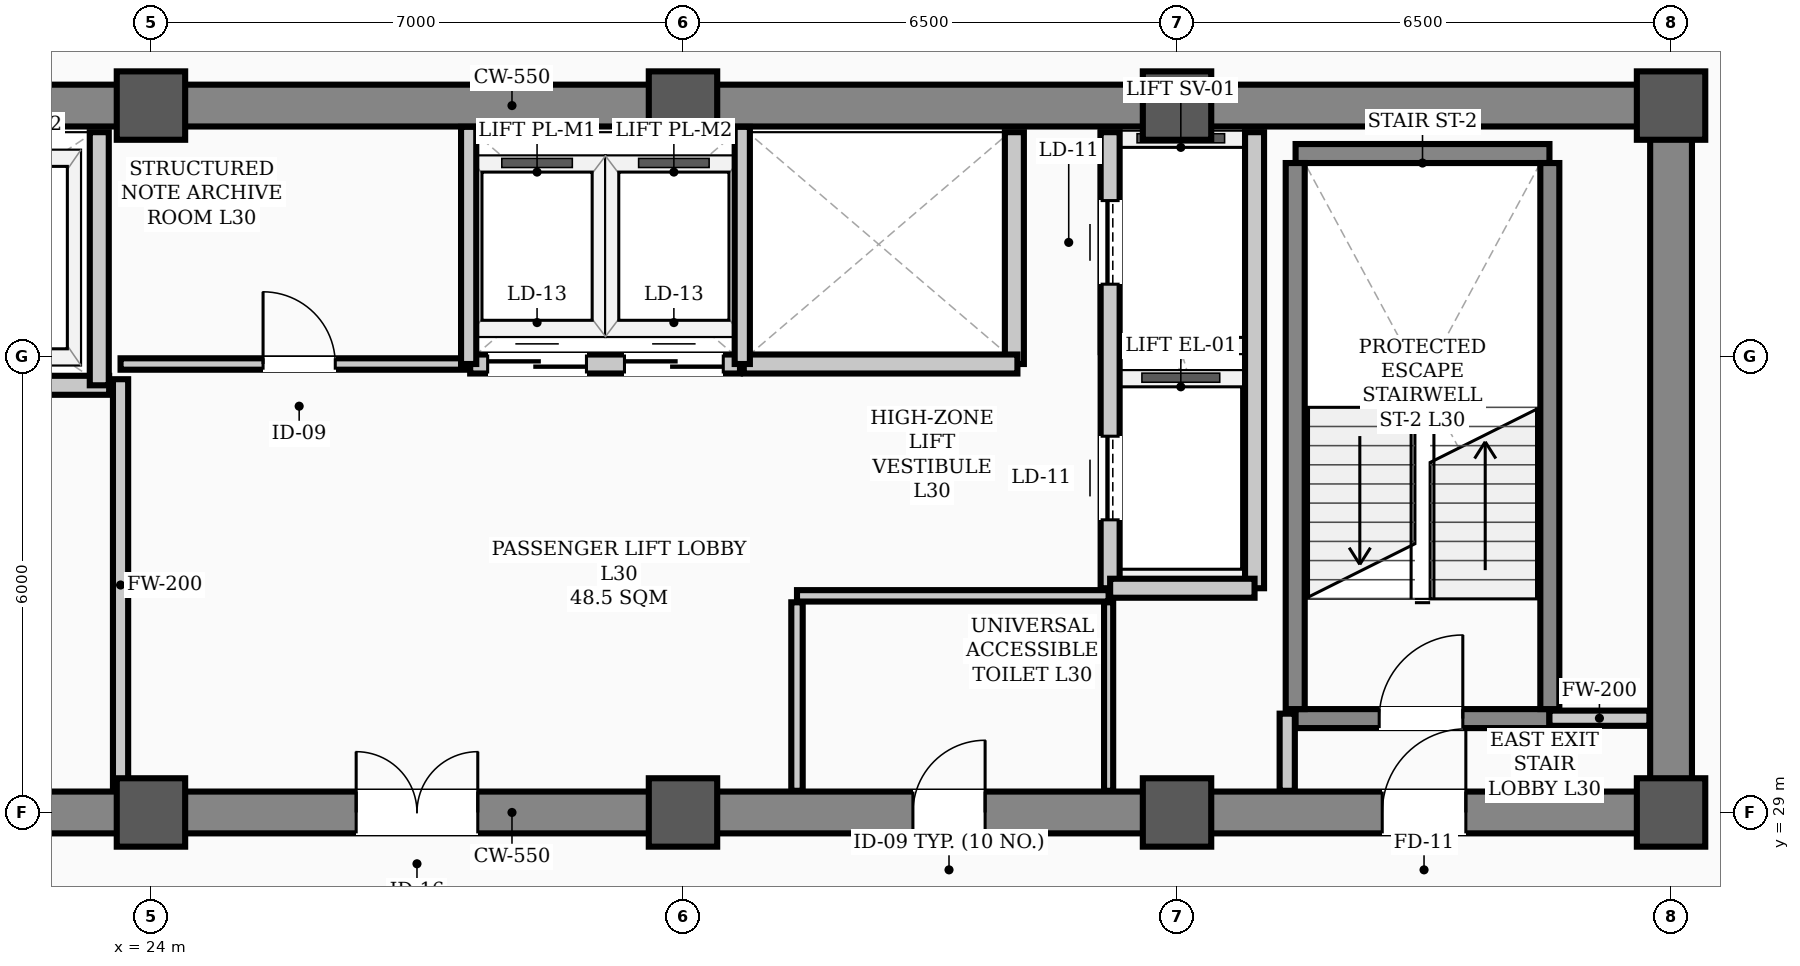
"""IFC4 building model, lengths in metres.
Left out: names, types, materials, properties, quantities, classifications, styles, units other than length and angle.
Written with IfcOpenShell. Run it as: python <this file> out.ifc"""

import sys

from ifc_helpers import new_model, si_unit, direction, frame, frame_2d, origin, origin_2d, place, context, subcontext, project, spatial, rectangle, hollow_rectangle, extrude, element, fill, save


model = new_model("IFC4")
c1 = context("Model", 3, precision=1e-05, world=origin(), true_north=direction((0.0, 1.0)))
c2 = subcontext(c1, "Body", "Model", "MODEL_VIEW")
j1 = project(units=[si_unit("LENGTHUNIT", "METRE"), si_unit("PLANEANGLEUNIT", "RADIAN")], contexts=[c1])
p1 = place(None, origin())
s1 = spatial("IfcSite", under=j1, at=p1, CompositionType="ELEMENT")
p2 = place(p1, origin())
s2 = spatial("IfcBuilding", under=s1, at=p2, CompositionType="ELEMENT")
p3 = place(p2, frame((0.0, 0.0, 122.7)))
s3 = spatial("IfcBuildingStorey", under=s2, at=p3, CompositionType="ELEMENT", Elevation=122.7)
for number, where, z_axis, x_axis in (
    (1, (24.0, 29.0, 0.0), (0.0, 0.0, 1.0), (1.0, 0.0, 0.0)),
    (2, (24.0, 38.3, 0.0), (0.0, 0.0, 1.0), (1.0, 0.0, 0.0)),
    (3, (31.0, 29.0, 0.0), (0.0, 0.0, 1.0), (1.0, 0.0, 0.0)),
    (4, (31.0, 38.3, 0.0), (0.0, 0.0, 1.0), (1.0, 0.0, 0.0)),
    (5, (37.5, 29.0, 0.0), (0.0, 0.0, 1.0), (1.0, 0.0, 0.0)),
    (6, (37.5, 38.3, 0.0), (0.0, 0.0, 1.0), (1.0, 0.0, 0.0)),
    (7, (44.0, 29.0, 0.0), (0.0, 0.0, 1.0), (1.0, 0.0, 0.0)),
    (8, (44.0, 38.3, 0.0), (0.0, 0.0, 1.0), (1.0, 0.0, 0.0)),
):
    element("IfcColumn", number, at=place(p3, frame(where, z_axis=z_axis, x_axis=x_axis)), inside=s3, PredefinedType="COLUMN", context=c2, shape_type="SweptSolid", body=[
        extrude(hollow_rectangle(XDim=0.9, YDim=0.9, WallThickness=0.035, InnerFilletRadius=0.017, OuterFilletRadius=0.052, at=origin_2d()), origin(), (0.0, 0.0, 1.0), 3.9),
    ])
p4 = place(p3, frame((13.5, 29.0, 0.0), z_axis=(0.0, 0.0, 1.0), x_axis=(1.0, 0.0, 0.0)))
e9 = element("IfcWall", 9, at=p4, inside=s3, PredefinedType="SHEAR", context=c2, shape_type="SweptSolid", body=[
    extrude(rectangle(XDim=30.5, YDim=0.55, at=frame_2d((15.25, 0.0))), origin(), (0.0, 0.0, 1.0), 3.72),
])
p5 = place(p4, frame((1.75, 0.0, 0.0)))
e10 = element("IfcOpeningElement", 10, at=p5, cuts=e9, PredefinedType="OPENING", context=c2, shape_type="SweptSolid", body=[
    extrude(rectangle(XDim=1.1, YDim=2.08, at=frame_2d((0.55, 1.04))), frame((0.0, 0.285, 0.0), z_axis=(0.0, -1.0, 0.0), x_axis=(1.0, 0.0, 0.0)), (0.0, 0.0, 1.0), 0.57),
])
p6 = place(p4, frame((26.7, 0.0, 0.0)))
e11 = element("IfcOpeningElement", 11, at=p6, cuts=e9, PredefinedType="OPENING", context=c2, shape_type="SweptSolid", body=[
    extrude(rectangle(XDim=1.1, YDim=2.08, at=frame_2d((0.55, 1.04))), frame((0.0, 0.285, 0.0), z_axis=(0.0, -1.0, 0.0), x_axis=(1.0, 0.0, 0.0)), (0.0, 0.0, 1.0), 0.57),
])
p7 = place(p4, frame((6.8, 0.0, 0.0)))
e12 = element("IfcOpeningElement", 12, at=p7, cuts=e9, PredefinedType="OPENING", context=c2, shape_type="SweptSolid", body=[
    extrude(rectangle(XDim=1.1, YDim=2.08, at=frame_2d((0.55, 1.04))), frame((0.0, 0.285, 0.0), z_axis=(0.0, -1.0, 0.0), x_axis=(1.0, 0.0, 0.0)), (0.0, 0.0, 1.0), 0.57),
])
p8 = place(p4, frame((13.2, 0.0, 0.0)))
e13 = element("IfcOpeningElement", 13, at=p8, cuts=e9, PredefinedType="OPENING", context=c2, shape_type="SweptSolid", body=[
    extrude(rectangle(XDim=1.6, YDim=2.08, at=frame_2d((0.8, 1.04))), frame((0.0, 0.285, 0.0), z_axis=(0.0, -1.0, 0.0), x_axis=(1.0, 0.0, 0.0)), (0.0, 0.0, 1.0), 0.57),
])
p9 = place(p4, frame((20.525, 0.0, 0.0)))
e14 = element("IfcOpeningElement", 14, at=p9, cuts=e9, PredefinedType="OPENING", context=c2, shape_type="SweptSolid", body=[
    extrude(rectangle(XDim=0.95, YDim=2.08, at=frame_2d((0.475, 1.04))), frame((0.0, 0.285, 0.0), z_axis=(0.0, -1.0, 0.0), x_axis=(1.0, 0.0, 0.0)), (0.0, 0.0, 1.0), 0.57),
])
p10 = place(p3, frame((13.5, 38.3, 0.0), z_axis=(0.0, 0.0, 1.0), x_axis=(1.0, 0.0, 0.0)))
e15 = element("IfcWall", 15, at=p10, inside=s3, PredefinedType="SHEAR", context=c2, shape_type="SweptSolid", body=[
    extrude(rectangle(XDim=30.5, YDim=0.55, at=frame_2d((15.25, 0.0))), origin(), (0.0, 0.0, 1.0), 3.72),
])
p11 = place(p3, frame((44.0, 29.35, 0.0), z_axis=(0.0, 0.0, 1.0), x_axis=(0.0, 1.0, 0.0)))
e16 = element("IfcWall", 16, at=p11, inside=s3, PredefinedType="SHEAR", context=c2, shape_type="SweptSolid", body=[
    extrude(rectangle(XDim=8.6, YDim=0.55, at=frame_2d((4.3, 0.0))), origin(), (0.0, 0.0, 1.0), 3.72),
])
p12 = place(p3, frame((39.06, 30.235, 0.0), z_axis=(0.0, 0.0, 1.0), x_axis=(1.0, 0.0, 0.0)))
e17 = element("IfcWall", 17, at=p12, inside=s3, PredefinedType="STANDARD", context=c2, shape_type="SweptSolid", body=[
    extrude(rectangle(XDim=3.34, YDim=0.25, at=frame_2d((1.67, 0.0))), origin(), (0.0, 0.0, 1.0), 3.72),
])
p13 = place(p12, frame((1.1, 0.0, 0.0)))
e18 = element("IfcOpeningElement", 18, at=p13, cuts=e17, PredefinedType="OPENING", context=c2, shape_type="SweptSolid", body=[
    extrude(rectangle(XDim=1.1, YDim=2.08, at=frame_2d((0.55, 1.04))), frame((0.0, 0.135, 0.0), z_axis=(0.0, -1.0, 0.0), x_axis=(1.0, 0.0, 0.0)), (0.0, 0.0, 1.0), 0.27),
])
p14 = place(p3, frame((39.06, 37.669, 0.0), z_axis=(0.0, 0.0, 1.0), x_axis=(1.0, 0.0, 0.0)))
e19 = element("IfcWall", 19, at=p14, inside=s3, PredefinedType="STANDARD", context=c2, shape_type="SweptSolid", body=[
    extrude(rectangle(XDim=3.34, YDim=0.25, at=frame_2d((1.67, 0.0))), origin(), (0.0, 0.0, 1.0), 3.72),
])
for number, where, z_axis, x_axis in (
    (20, (39.055, 30.36, 0.0), (0.0, 0.0, 1.0), (0.0, 1.0, 0.0)),
    (21, (42.405, 30.36, 0.0), (0.0, 0.0, 1.0), (0.0, 1.0, 0.0)),
):
    element("IfcWall", number, at=place(p3, frame(where, z_axis=z_axis, x_axis=x_axis)), inside=s3, PredefinedType="STANDARD", context=c2, shape_type="SweptSolid", body=[
        extrude(rectangle(XDim=7.184, YDim=0.25, at=frame_2d((3.592, 0.0))), origin(), (0.0, 0.0, 1.0), 3.72),
    ])
p15 = place(p3, frame((18.1, 34.62, 0.0), z_axis=(0.0, 0.0, 1.0), x_axis=(1.0, 0.0, 0.0)))
e22 = element("IfcWall", 22, at=p15, inside=s3, PredefinedType="STANDARD", context=c2, shape_type="SweptSolid", body=[
    extrude(rectangle(XDim=5.35, YDim=0.25, at=frame_2d((2.675, 0.0))), origin(), (0.0, 0.0, 1.0), 3.72),
])
p16 = place(p15, frame((0.85, 0.0, 0.0)))
e23 = element("IfcOpeningElement", 23, at=p16, cuts=e22, PredefinedType="OPENING", context=c2, shape_type="SweptSolid", body=[
    extrude(rectangle(XDim=1.1, YDim=2.08, at=frame_2d((0.55, 1.04))), frame((0.0, 0.135, 0.0), z_axis=(0.0, -1.0, 0.0), x_axis=(1.0, 0.0, 0.0)), (0.0, 0.0, 1.0), 0.27),
])
p17 = place(p15, frame((3.45, 0.0, 0.0)))
e24 = element("IfcOpeningElement", 24, at=p17, cuts=e22, PredefinedType="OPENING", context=c2, shape_type="SweptSolid", body=[
    extrude(rectangle(XDim=1.1, YDim=2.08, at=frame_2d((0.55, 1.04))), frame((0.0, 0.135, 0.0), z_axis=(0.0, -1.0, 0.0), x_axis=(1.0, 0.0, 0.0)), (0.0, 0.0, 1.0), 0.27),
])
p18 = place(p3, frame((36.62, 31.95, 0.0), z_axis=(0.0, 0.0, 1.0), x_axis=(0.0, 1.0, 0.0)))
e25 = element("IfcWall", 25, at=p18, inside=s3, PredefinedType="STANDARD", context=c2, shape_type="SweptSolid", body=[
    extrude(rectangle(XDim=6.0, YDim=0.25, at=frame_2d((3.0, 0.0))), origin(), (0.0, 0.0, 1.0), 3.72),
])
p19 = place(p18, frame((0.9, 0.0, 0.0)))
e26 = element("IfcOpeningElement", 26, at=p19, cuts=e25, PredefinedType="OPENING", context=c2, shape_type="SweptSolid", body=[
    extrude(rectangle(XDim=1.1, YDim=2.08, at=frame_2d((0.55, 1.04))), frame((0.0, 0.135, 0.0), z_axis=(0.0, -1.0, 0.0), x_axis=(1.0, 0.0, 0.0)), (0.0, 0.0, 1.0), 0.27),
])
p20 = place(p18, frame((4.0, 0.0, 0.0)))
e27 = element("IfcOpeningElement", 27, at=p20, cuts=e25, PredefinedType="OPENING", context=c2, shape_type="SweptSolid", body=[
    extrude(rectangle(XDim=1.1, YDim=2.08, at=frame_2d((0.55, 1.04))), frame((0.0, 0.135, 0.0), z_axis=(0.0, -1.0, 0.0), x_axis=(1.0, 0.0, 0.0)), (0.0, 0.0, 1.0), 0.27),
])
p21 = place(p3, frame((38.52, 31.95, 0.0), z_axis=(0.0, 0.0, 1.0), x_axis=(0.0, 1.0, 0.0)))
e28 = element("IfcWall", 28, at=p21, inside=s3, PredefinedType="STANDARD", context=c2, shape_type="SweptSolid", body=[
    extrude(rectangle(XDim=6.0, YDim=0.25, at=frame_2d((3.0, 0.0))), origin(), (0.0, 0.0, 1.0), 3.48),
])
p22 = place(p3, frame((36.62, 31.95, 0.0), z_axis=(0.0, 0.0, 1.0), x_axis=(1.0, 0.0, 0.0)))
e29 = element("IfcWall", 29, at=p22, inside=s3, PredefinedType="STANDARD", context=c2, shape_type="SweptSolid", body=[
    extrude(rectangle(XDim=1.9, YDim=0.25, at=frame_2d((0.95, 0.0))), origin(), (0.0, 0.0, 1.0), 3.48),
])
p23 = place(p3, frame((23.32, 34.62, 0.0), z_axis=(0.0, 0.0, 1.0), x_axis=(0.0, 1.0, 0.0)))
e30 = element("IfcWall", 30, at=p23, inside=s3, PredefinedType="STANDARD", context=c2, shape_type="SweptSolid", body=[
    extrude(rectangle(XDim=3.33, YDim=0.25, at=frame_2d((1.665, 0.0))), origin(), (0.0, 0.0, 1.0), 3.72),
])
p24 = place(p3, frame((35.36, 34.9, 0.0), z_axis=(0.0, 0.0, 1.0), x_axis=(0.0, 1.0, 0.0)))
e31 = element("IfcWall", 31, at=p24, inside=s3, PredefinedType="STANDARD", context=c2, shape_type="SweptSolid", body=[
    extrude(rectangle(XDim=3.05, YDim=0.25, at=frame_2d((1.525, 0.0))), origin(), (0.0, 0.0, 1.0), 3.72),
])
p25 = place(p3, frame((28.2, 34.9, 0.0), z_axis=(0.0, 0.0, 1.0), x_axis=(1.0, 0.0, 0.0)))
e32 = element("IfcWall", 32, at=p25, inside=s3, PredefinedType="STANDARD", context=c2, shape_type="SweptSolid", body=[
    extrude(rectangle(XDim=3.55, YDim=0.25, at=frame_2d((1.775, 0.0))), origin(), (0.0, 0.0, 1.0), 3.72),
])
p26 = place(p25, frame((0.23, 0.0, 0.0)))
e33 = element("IfcOpeningElement", 33, at=p26, cuts=e32, PredefinedType="OPENING", context=c2, shape_type="SweptSolid", body=[
    extrude(rectangle(XDim=1.3, YDim=2.08, at=frame_2d((0.65, 1.04))), frame((0.0, 0.135, 0.0), z_axis=(0.0, -1.0, 0.0), x_axis=(1.0, 0.0, 0.0)), (0.0, 0.0, 1.0), 0.27),
])
p27 = place(p25, frame((2.03, 0.0, 0.0)))
e34 = element("IfcOpeningElement", 34, at=p27, cuts=e32, PredefinedType="OPENING", context=c2, shape_type="SweptSolid", body=[
    extrude(rectangle(XDim=1.3, YDim=2.08, at=frame_2d((0.65, 1.04))), frame((0.0, 0.135, 0.0), z_axis=(0.0, -1.0, 0.0), x_axis=(1.0, 0.0, 0.0)), (0.0, 0.0, 1.0), 0.27),
])
p28 = place(p3, frame((31.8, 34.9, 0.0), z_axis=(0.0, 0.0, 1.0), x_axis=(1.0, 0.0, 0.0)))
e35 = element("IfcWall", 35, at=p28, inside=s3, PredefinedType="STANDARD", context=c2, shape_type="SweptSolid", body=[
    extrude(rectangle(XDim=3.6, YDim=0.25, at=frame_2d((1.8, 0.0))), origin(), (0.0, 0.0, 1.0), 3.72),
])
p29 = place(p3, frame((42.4, 30.24, 0.0), z_axis=(0.0, 0.0, 1.0), x_axis=(1.0, 0.0, 0.0)))
e36 = element("IfcWall", 36, at=p29, inside=s3, PredefinedType="STANDARD", context=c2, shape_type="SweptSolid", body=[
    extrude(rectangle(XDim=1.315, YDim=0.2, at=frame_2d((0.658, 0.0))), origin(), (0.0, 0.0, 1.0), 3.1),
])
p30 = place(p3, frame((23.6, 34.9, 0.0), z_axis=(0.0, 0.0, 1.0), x_axis=(1.0, 0.0, 0.0)))
e37 = element("IfcWall", 37, at=p30, inside=s3, PredefinedType="PARTITIONING", context=c2, shape_type="SweptSolid", body=[
    extrude(rectangle(XDim=4.58, YDim=0.15, at=frame_2d((2.29, 0.0))), origin(), (0.0, 0.0, 1.0), 3.72),
])
p31 = place(p30, frame((1.875, 0.0, 0.0)))
e38 = element("IfcOpeningElement", 38, at=p31, cuts=e37, PredefinedType="OPENING", context=c2, shape_type="SweptSolid", body=[
    extrude(rectangle(XDim=0.95, YDim=2.08, at=frame_2d((0.475, 1.04))), frame((0.0, 0.085, 0.0), z_axis=(0.0, -1.0, 0.0), x_axis=(1.0, 0.0, 0.0)), (0.0, 0.0, 1.0), 0.17),
])
p32 = place(p3, frame((32.5, 31.85, 0.0), z_axis=(0.0, 0.0, 1.0), x_axis=(1.0, 0.0, 0.0)))
e39 = element("IfcWall", 39, at=p32, inside=s3, PredefinedType="PARTITIONING", context=c2, shape_type="SweptSolid", body=[
    extrude(rectangle(XDim=4.1, YDim=0.15, at=frame_2d((2.05, 0.0))), origin(), (0.0, 0.0, 1.0), 3.72),
])
p33 = place(p3, frame((38.95, 29.285, 0.0), z_axis=(0.0, 0.0, 1.0), x_axis=(0.0, 1.0, 0.0)))
e40 = element("IfcWall", 40, at=p33, inside=s3, PredefinedType="STANDARD", context=c2, shape_type="SweptSolid", body=[
    extrude(rectangle(XDim=1.015, YDim=0.2, at=frame_2d((0.508, 0.0))), origin(), (0.0, 0.0, 1.0), 3.3),
])
p34 = place(p3, frame((23.6, 29.285, 0.0), z_axis=(0.0, 0.0, 1.0), x_axis=(0.0, 1.0, 0.0)))
e41 = element("IfcWall", 41, at=p34, inside=s3, PredefinedType="STANDARD", context=c2, shape_type="SweptSolid", body=[
    extrude(rectangle(XDim=5.415, YDim=0.2, at=frame_2d((2.708, 0.0))), origin(), (0.0, 0.0, 1.0), 3.1),
])
p35 = place(p3, frame((32.5, 29.285, 0.0), z_axis=(0.0, 0.0, 1.0), x_axis=(0.0, 1.0, 0.0)))
e42 = element("IfcWall", 42, at=p35, inside=s3, PredefinedType="PARTITIONING", context=c2, shape_type="SweptSolid", body=[
    extrude(rectangle(XDim=2.48, YDim=0.15, at=frame_2d((1.24, 0.0))), origin(), (0.0, 0.0, 1.0), 3.3),
])
p36 = place(p3, frame((36.6, 29.285, 0.0), z_axis=(0.0, 0.0, 1.0), x_axis=(0.0, 1.0, 0.0)))
e43 = element("IfcWall", 43, at=p36, inside=s3, PredefinedType="PARTITIONING", context=c2, shape_type="SweptSolid", body=[
    extrude(rectangle(XDim=2.48, YDim=0.12, at=frame_2d((1.24, 0.0))), origin(), (0.0, 0.0, 1.0), 3.3),
])
for number, where, z_axis, x_axis in (
    (44, (28.18, 34.9, 0.0), (0.0, 0.0, 1.0), (0.0, 1.0, 0.0)),
    (45, (31.78, 34.9, 0.0), (0.0, 0.0, 1.0), (0.0, 1.0, 0.0)),
):
    element("IfcWall", number, at=place(p3, frame(where, z_axis=z_axis, x_axis=x_axis)), inside=s3, PredefinedType="STANDARD", context=c2, shape_type="SweptSolid", body=[
        extrude(rectangle(XDim=3.12, YDim=0.2, at=frame_2d((1.56, 0.0))), origin(), (0.0, 0.0, 1.0), 3.72),
    ])
p37 = place(p13, origin())
e46 = element("IfcDoor", 46, at=p37, inside=s3, OperationType="SINGLE_SWING_RIGHT", PredefinedType="DOOR", context=c2, shape_type="SweptSolid", body=[
    extrude(rectangle(XDim=1.1, YDim=2.08, at=frame_2d((0.55, 1.04))), frame((0.0, 0.025, 0.0), z_axis=(0.0, -1.0, 0.0), x_axis=(1.0, 0.0, 0.0)), (0.0, 0.0, 1.0), 0.05),
])
fill(e18, e46)
p38 = place(p6, origin())
e47 = element("IfcDoor", 47, at=p38, inside=s3, OperationType="SINGLE_SWING_RIGHT", PredefinedType="DOOR", context=c2, shape_type="SweptSolid", body=[
    extrude(rectangle(XDim=1.1, YDim=2.08, at=frame_2d((0.55, 1.04))), frame((0.0, 0.025, 0.0), z_axis=(0.0, -1.0, 0.0), x_axis=(1.0, 0.0, 0.0)), (0.0, 0.0, 1.0), 0.05),
])
fill(e11, e47)
p39 = place(p8, origin())
e48 = element("IfcDoor", 48, at=p39, inside=s3, OperationType="DOUBLE_DOOR_SINGLE_SWING", PredefinedType="DOOR", context=c2, shape_type="SweptSolid", body=[
    extrude(rectangle(XDim=1.6, YDim=2.08, at=frame_2d((0.8, 1.04))), frame((0.0, 0.025, 0.0), z_axis=(0.0, -1.0, 0.0), x_axis=(1.0, 0.0, 0.0)), (0.0, 0.0, 1.0), 0.05),
])
fill(e13, e48)
p40 = place(p31, origin())
e49 = element("IfcDoor", 49, at=p40, inside=s3, OperationType="SINGLE_SWING_LEFT", PredefinedType="DOOR", context=c2, shape_type="SweptSolid", body=[
    extrude(rectangle(XDim=0.95, YDim=2.08, at=frame_2d((0.475, 1.04))), frame((0.0, 0.025, 0.0), z_axis=(0.0, -1.0, 0.0), x_axis=(1.0, 0.0, 0.0)), (0.0, 0.0, 1.0), 0.05),
])
fill(e38, e49)
p41 = place(p9, origin())
e50 = element("IfcDoor", 50, at=p41, inside=s3, OperationType="SINGLE_SWING_RIGHT", PredefinedType="DOOR", context=c2, shape_type="SweptSolid", body=[
    extrude(rectangle(XDim=0.95, YDim=2.08, at=frame_2d((0.475, 1.04))), frame((0.0, 0.025, 0.0), z_axis=(0.0, -1.0, 0.0), x_axis=(1.0, 0.0, 0.0)), (0.0, 0.0, 1.0), 0.05),
])
fill(e14, e50)
p42 = place(p19, origin())
e51 = element("IfcDoor", 51, at=p42, inside=s3, OperationType="SLIDING_TO_LEFT", PredefinedType="DOOR", context=c2, shape_type="SweptSolid", body=[
    extrude(rectangle(XDim=1.1, YDim=2.08, at=frame_2d((0.55, 1.04))), frame((0.0, 0.025, 0.0), z_axis=(0.0, -1.0, 0.0), x_axis=(1.0, 0.0, 0.0)), (0.0, 0.0, 1.0), 0.05),
])
fill(e26, e51)
p43 = place(p20, origin())
e52 = element("IfcDoor", 52, at=p43, inside=s3, OperationType="SLIDING_TO_LEFT", PredefinedType="DOOR", context=c2, shape_type="SweptSolid", body=[
    extrude(rectangle(XDim=1.1, YDim=2.08, at=frame_2d((0.55, 1.04))), frame((0.0, 0.025, 0.0), z_axis=(0.0, -1.0, 0.0), x_axis=(1.0, 0.0, 0.0)), (0.0, 0.0, 1.0), 0.05),
])
fill(e27, e52)
p44 = place(p26, origin())
e53 = element("IfcDoor", 53, at=p44, inside=s3, OperationType="DOUBLE_DOOR_SLIDING", PredefinedType="DOOR", context=c2, shape_type="SweptSolid", body=[
    extrude(rectangle(XDim=1.3, YDim=2.08, at=frame_2d((0.65, 1.04))), frame((0.0, 0.025, 0.0), z_axis=(0.0, -1.0, 0.0), x_axis=(1.0, 0.0, 0.0)), (0.0, 0.0, 1.0), 0.05),
])
fill(e33, e53)
p45 = place(p27, origin())
e54 = element("IfcDoor", 54, at=p45, inside=s3, OperationType="DOUBLE_DOOR_SLIDING", PredefinedType="DOOR", context=c2, shape_type="SweptSolid", body=[
    extrude(rectangle(XDim=1.3, YDim=2.08, at=frame_2d((0.65, 1.04))), frame((0.0, 0.025, 0.0), z_axis=(0.0, -1.0, 0.0), x_axis=(1.0, 0.0, 0.0)), (0.0, 0.0, 1.0), 0.05),
])
fill(e34, e54)
save(model, sys.argv[1])
